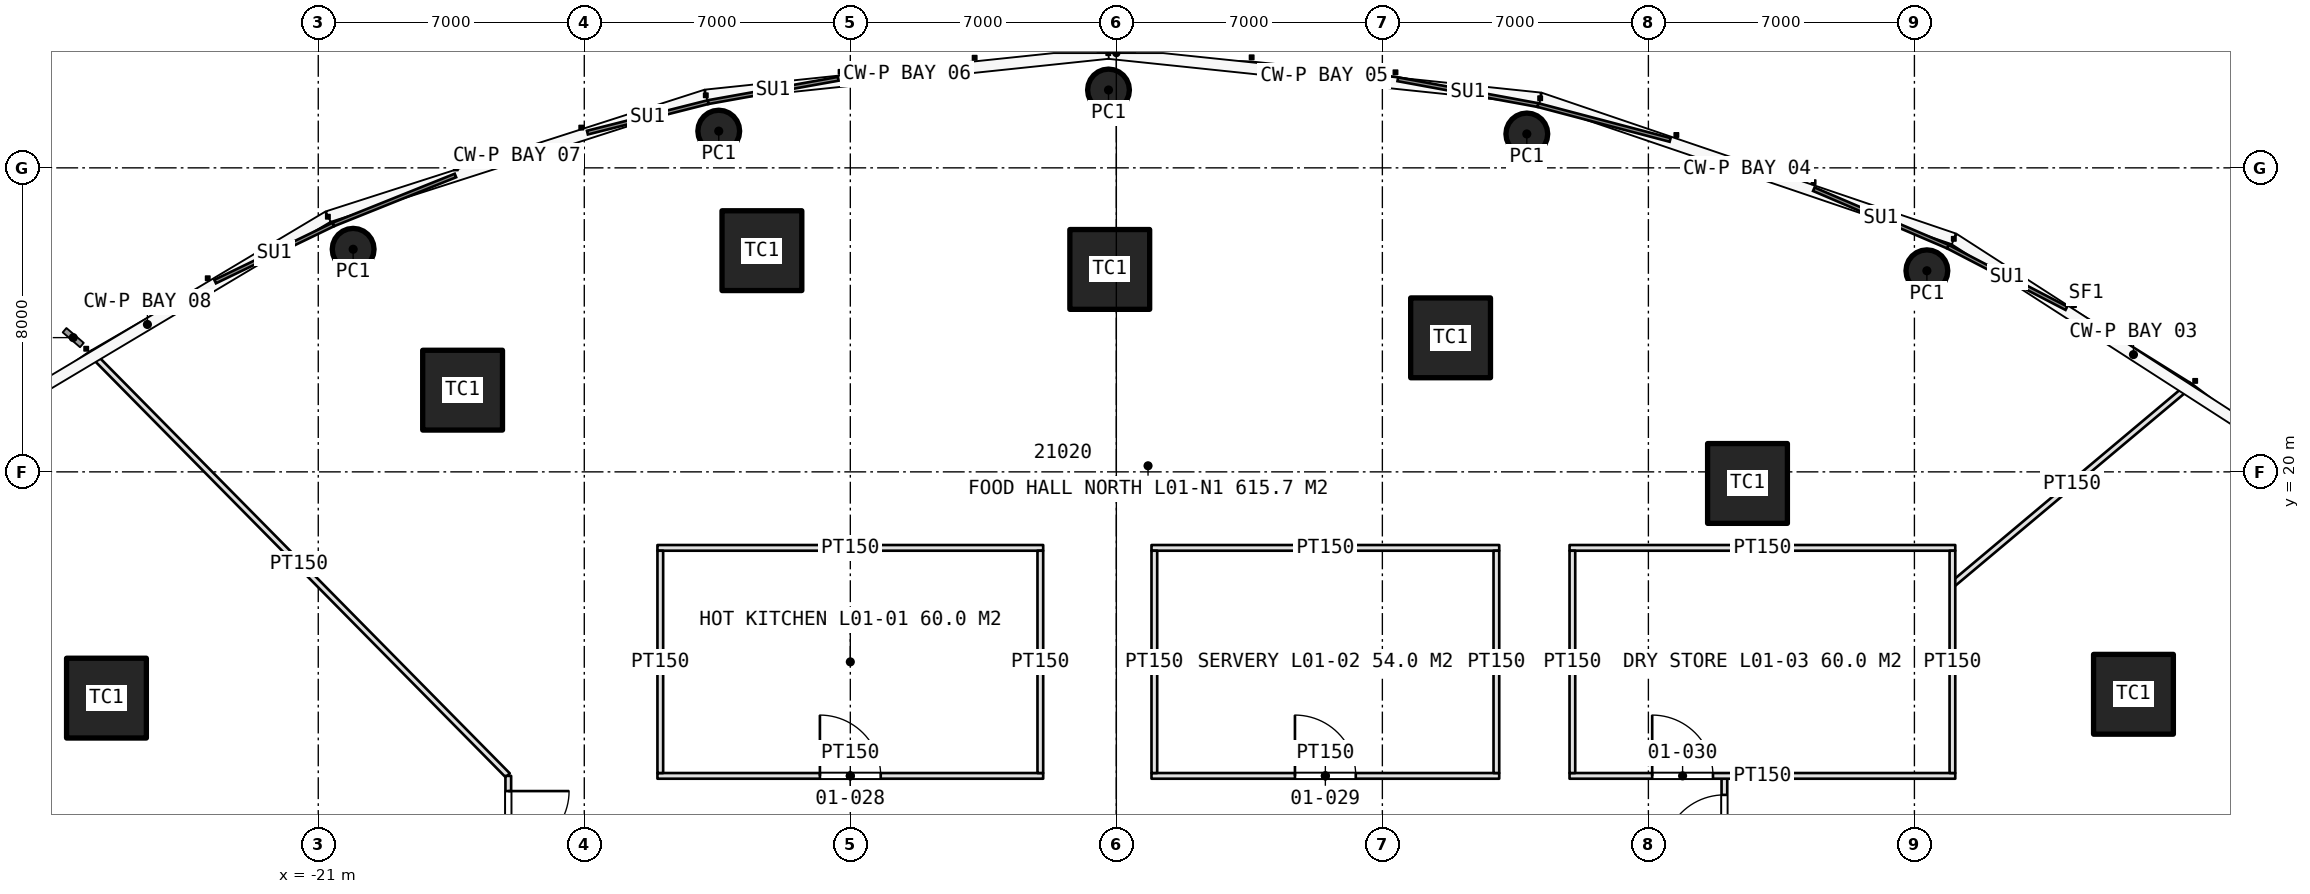
"""IFC4 building model, lengths in metres.
Left out: names, types, materials, properties, quantities, classifications, styles, units other than length and angle.
Written with IfcOpenShell. Run it as: python <this file> out.ifc"""

import sys

from ifc_helpers import new_model, si_unit, direction, frame, frame_2d, origin, origin_2d, place, context, subcontext, project, spatial, rectangle, circle, extrude, element, fill, save


model = new_model("IFC4")
c1 = context("Model", 3, precision=1e-05, world=origin(), true_north=direction((0.0, 1.0)))
c2 = subcontext(c1, "Body", "Model", "MODEL_VIEW")
j1 = project(units=[si_unit("LENGTHUNIT", "METRE"), si_unit("PLANEANGLEUNIT", "RADIAN")], contexts=[c1])
p1 = place(None, origin())
s1 = spatial("IfcSite", under=j1, at=p1, CompositionType="ELEMENT")
p2 = place(p1, origin())
s2 = spatial("IfcBuilding", under=s1, at=p2, CompositionType="ELEMENT")
p3 = place(p2, frame((0.0, 0.0, 5.0)))
s3 = spatial("IfcBuildingStorey", under=s2, at=p3, CompositionType="ELEMENT", Elevation=5.0)
for number, where, z_axis, x_axis in (
    (1, (26.764, 14.147, 0.0), (0.0, 0.0, 1.0), (1.0, 0.0, 0.0)),
    (2, (16.608, 19.695, 0.0), (0.0, 0.0, 1.0), (1.0, 0.0, 0.0)),
    (3, (8.795, 23.527, 0.0), (0.0, 0.0, 1.0), (1.0, 0.0, 0.0)),
    (4, (-0.173, 25.327, 0.0), (0.0, 0.0, 1.0), (1.0, 0.0, 0.0)),
    (5, (-9.326, 25.821, 0.0), (0.0, 0.0, 1.0), (1.0, 0.0, 0.0)),
    (6, (-17.202, 22.15, 0.0), (0.0, 0.0, 1.0), (1.0, 0.0, 0.0)),
    (7, (-26.573, 14.046, 0.0), (0.0, 0.0, 1.0), (1.0, 0.0, 0.0)),
):
    element("IfcColumn", number, at=place(p3, frame(where, z_axis=z_axis, x_axis=x_axis)), inside=s3, PredefinedType="COLUMN", context=c2, shape_type="SweptSolid", body=[
        extrude(rectangle(XDim=2.1, YDim=2.1, at=origin_2d()), origin(), (0.0, 0.0, 1.0), 5.0),
    ])
for number, where, z_axis, x_axis in (
    (8, (21.328, 25.292, 0.0), (0.0, 0.0, 1.0), (1.0, 0.0, 0.0)),
    (9, (10.801, 28.892, 0.0), (0.0, 0.0, 1.0), (1.0, 0.0, 0.0)),
    (10, (-0.206, 30.049, 0.0), (0.0, 0.0, 1.0), (1.0, 0.0, 0.0)),
    (11, (-10.462, 28.967, 0.0), (0.0, 0.0, 1.0), (1.0, 0.0, 0.0)),
    (12, (-20.082, 25.858, 0.0), (0.0, 0.0, 1.0), (1.0, 0.0, 0.0)),
):
    element("IfcColumn", number, at=place(p3, frame(where, z_axis=z_axis, x_axis=x_axis)), inside=s3, PredefinedType="COLUMN", context=c2, shape_type="SweptSolid", body=[
        extrude(circle(Radius=0.55, at=origin_2d()), origin(), (0.0, 0.0, 1.0), 5.0),
    ])
p4 = place(p3, frame((-16.014, 12.014, 0.0), z_axis=(0.0, 0.0, 1.0), x_axis=(-0.702408551969, 0.711773999329, 0.0)))
e13 = element("IfcWall", 13, at=p4, inside=s3, PredefinedType="PARTITIONING", context=c2, shape_type="SweptSolid", body=[
    extrude(rectangle(XDim=15.641, YDim=0.15, at=frame_2d((7.82, 0.0))), origin(), (0.0, 0.0, 1.0), 3.8),
])
p5 = place(p3, frame((22.02, 17.053, 0.0), z_axis=(0.0, 0.0, 1.0), x_axis=(0.765913812557, 0.64294325701, 0.0)))
e14 = element("IfcWall", 14, at=p5, inside=s3, PredefinedType="PARTITIONING", context=c2, shape_type="SweptSolid", body=[
    extrude(rectangle(XDim=8.17, YDim=0.15, at=frame_2d((4.085, 0.0))), origin(), (0.0, 0.0, 1.0), 3.8),
])
p6 = place(p3, frame((16.0, -12.0, 0.0), z_axis=(0.0, 0.0, 1.0), x_axis=(0.0, 1.0, 0.0)))
e15 = element("IfcWall", 15, at=p6, inside=s3, PredefinedType="PARTITIONING", context=c2, shape_type="SweptSolid", body=[
    extrude(rectangle(XDim=24.0, YDim=0.15, at=frame_2d((12.0, 0.0))), origin(), (0.0, 0.0, 1.0), 3.8),
])
p7 = place(p6, frame((10.15, 0.0, 0.0)))
e16 = element("IfcOpeningElement", 16, at=p7, cuts=e15, PredefinedType="OPENING", context=c2, shape_type="SweptSolid", body=[
    extrude(rectangle(XDim=1.6, YDim=2.4, at=frame_2d((0.8, 1.2))), frame((0.0, 0.085, 0.0), z_axis=(0.0, -1.0, 0.0), x_axis=(1.0, 0.0, 0.0)), (0.0, 0.0, 1.0), 0.17),
])
p8 = place(p6, frame((21.9, 0.0, 0.0)))
e17 = element("IfcOpeningElement", 17, at=p8, cuts=e15, PredefinedType="OPENING", context=c2, shape_type="SweptSolid", body=[
    extrude(rectangle(XDim=1.6, YDim=2.4, at=frame_2d((0.8, 1.2))), frame((0.0, 0.085, 0.0), z_axis=(0.0, -1.0, 0.0), x_axis=(1.0, 0.0, 0.0)), (0.0, 0.0, 1.0), 0.17),
])
p9 = place(p6, frame((0.75, 0.0, 0.0)))
e18 = element("IfcOpeningElement", 18, at=p9, cuts=e15, PredefinedType="OPENING", context=c2, shape_type="SweptSolid", body=[
    extrude(rectangle(XDim=1.6, YDim=2.4, at=frame_2d((0.8, 1.2))), frame((0.0, 0.085, 0.0), z_axis=(0.0, -1.0, 0.0), x_axis=(1.0, 0.0, 0.0)), (0.0, 0.0, 1.0), 0.17),
])
p10 = place(p3, frame((-16.0, 12.0, 0.0), z_axis=(0.0, 0.0, 1.0), x_axis=(0.0, -1.0, 0.0)))
e19 = element("IfcWall", 19, at=p10, inside=s3, PredefinedType="PARTITIONING", context=c2, shape_type="SweptSolid", body=[
    extrude(rectangle(XDim=24.0, YDim=0.15, at=frame_2d((12.0, 0.0))), origin(), (0.0, 0.0, 1.0), 3.8),
])
p11 = place(p10, frame((12.15, 0.0, 0.0)))
e20 = element("IfcOpeningElement", 20, at=p11, cuts=e19, PredefinedType="OPENING", context=c2, shape_type="SweptSolid", body=[
    extrude(rectangle(XDim=1.6, YDim=2.4, at=frame_2d((0.8, 1.2))), frame((0.0, 0.085, 0.0), z_axis=(0.0, -1.0, 0.0), x_axis=(1.0, 0.0, 0.0)), (0.0, 0.0, 1.0), 0.17),
])
p12 = place(p10, frame((0.4, 0.0, 0.0)))
e21 = element("IfcOpeningElement", 21, at=p12, cuts=e19, PredefinedType="OPENING", context=c2, shape_type="SweptSolid", body=[
    extrude(rectangle(XDim=1.6, YDim=2.4, at=frame_2d((0.8, 1.2))), frame((0.0, 0.085, 0.0), z_axis=(0.0, -1.0, 0.0), x_axis=(1.0, 0.0, 0.0)), (0.0, 0.0, 1.0), 0.17),
])
p13 = place(p10, frame((21.9, 0.0, 0.0)))
e22 = element("IfcOpeningElement", 22, at=p13, cuts=e19, PredefinedType="OPENING", context=c2, shape_type="SweptSolid", body=[
    extrude(rectangle(XDim=1.6, YDim=2.4, at=frame_2d((0.8, 1.2))), frame((0.0, 0.085, 0.0), z_axis=(0.0, -1.0, 0.0), x_axis=(1.0, 0.0, 0.0)), (0.0, 0.0, 1.0), 0.17),
])
p14 = place(p3, frame((-12.075, 12.0, 0.0), z_axis=(0.0, 0.0, 1.0), x_axis=(1.0, 0.0, 0.0)))
e23 = element("IfcWall", 23, at=p14, inside=s3, PredefinedType="PARTITIONING", context=c2, shape_type="SweptSolid", body=[
    extrude(rectangle(XDim=10.15, YDim=0.15, at=frame_2d((5.075, 0.0))), origin(), (0.0, 0.0, 1.0), 3.8),
])
p15 = place(p14, frame((4.275, 0.0, 0.0)))
e24 = element("IfcOpeningElement", 24, at=p15, cuts=e23, PredefinedType="OPENING", context=c2, shape_type="SweptSolid", body=[
    extrude(rectangle(XDim=1.6, YDim=2.4, at=frame_2d((0.8, 1.2))), frame((0.0, 0.085, 0.0), z_axis=(0.0, -1.0, 0.0), x_axis=(1.0, 0.0, 0.0)), (0.0, 0.0, 1.0), 0.17),
])
p16 = place(p3, frame((-12.075, 18.0, 0.0), z_axis=(0.0, 0.0, 1.0), x_axis=(1.0, 0.0, 0.0)))
e25 = element("IfcWall", 25, at=p16, inside=s3, PredefinedType="PARTITIONING", context=c2, shape_type="SweptSolid", body=[
    extrude(rectangle(XDim=10.15, YDim=0.15, at=frame_2d((5.075, 0.0))), origin(), (0.0, 0.0, 1.0), 3.8),
])
for number, where, z_axis, x_axis in (
    (26, (-12.0, 12.075, 0.0), (0.0, 0.0, 1.0), (0.0, 1.0, 0.0)),
    (27, (-2.0, 12.075, 0.0), (0.0, 0.0, 1.0), (0.0, 1.0, 0.0)),
):
    element("IfcWall", number, at=place(p3, frame(where, z_axis=z_axis, x_axis=x_axis)), inside=s3, PredefinedType="PARTITIONING", context=c2, shape_type="SweptSolid", body=[
        extrude(rectangle(XDim=5.85, YDim=0.15, at=frame_2d((2.925, 0.0))), origin(), (0.0, 0.0, 1.0), 3.8),
    ])
p17 = place(p3, frame((0.925, 12.0, 0.0), z_axis=(0.0, 0.0, 1.0), x_axis=(1.0, 0.0, 0.0)))
e28 = element("IfcWall", 28, at=p17, inside=s3, PredefinedType="PARTITIONING", context=c2, shape_type="SweptSolid", body=[
    extrude(rectangle(XDim=9.15, YDim=0.15, at=frame_2d((4.575, 0.0))), origin(), (0.0, 0.0, 1.0), 3.8),
])
p18 = place(p17, frame((3.775, 0.0, 0.0)))
e29 = element("IfcOpeningElement", 29, at=p18, cuts=e28, PredefinedType="OPENING", context=c2, shape_type="SweptSolid", body=[
    extrude(rectangle(XDim=1.6, YDim=2.4, at=frame_2d((0.8, 1.2))), frame((0.0, 0.085, 0.0), z_axis=(0.0, -1.0, 0.0), x_axis=(1.0, 0.0, 0.0)), (0.0, 0.0, 1.0), 0.17),
])
p19 = place(p3, frame((0.925, 18.0, 0.0), z_axis=(0.0, 0.0, 1.0), x_axis=(1.0, 0.0, 0.0)))
e30 = element("IfcWall", 30, at=p19, inside=s3, PredefinedType="PARTITIONING", context=c2, shape_type="SweptSolid", body=[
    extrude(rectangle(XDim=9.15, YDim=0.15, at=frame_2d((4.575, 0.0))), origin(), (0.0, 0.0, 1.0), 3.8),
])
for number, where, z_axis, x_axis in (
    (31, (1.0, 12.075, 0.0), (0.0, 0.0, 1.0), (0.0, 1.0, 0.0)),
    (32, (10.0, 12.075, 0.0), (0.0, 0.0, 1.0), (0.0, 1.0, 0.0)),
):
    element("IfcWall", number, at=place(p3, frame(where, z_axis=z_axis, x_axis=x_axis)), inside=s3, PredefinedType="PARTITIONING", context=c2, shape_type="SweptSolid", body=[
        extrude(rectangle(XDim=5.85, YDim=0.15, at=frame_2d((2.925, 0.0))), origin(), (0.0, 0.0, 1.0), 3.8),
    ])
p20 = place(p3, frame((11.925, 12.0, 0.0), z_axis=(0.0, 0.0, 1.0), x_axis=(1.0, 0.0, 0.0)))
e33 = element("IfcWall", 33, at=p20, inside=s3, PredefinedType="PARTITIONING", context=c2, shape_type="SweptSolid", body=[
    extrude(rectangle(XDim=10.15, YDim=0.15, at=frame_2d((5.075, 0.0))), origin(), (0.0, 0.0, 1.0), 3.8),
])
p21 = place(p20, frame((2.175, 0.0, 0.0)))
e34 = element("IfcOpeningElement", 34, at=p21, cuts=e33, PredefinedType="OPENING", context=c2, shape_type="SweptSolid", body=[
    extrude(rectangle(XDim=1.6, YDim=2.4, at=frame_2d((0.8, 1.2))), frame((0.0, 0.085, 0.0), z_axis=(0.0, -1.0, 0.0), x_axis=(1.0, 0.0, 0.0)), (0.0, 0.0, 1.0), 0.17),
])
p22 = place(p3, frame((11.925, 18.0, 0.0), z_axis=(0.0, 0.0, 1.0), x_axis=(1.0, 0.0, 0.0)))
e35 = element("IfcWall", 35, at=p22, inside=s3, PredefinedType="PARTITIONING", context=c2, shape_type="SweptSolid", body=[
    extrude(rectangle(XDim=10.15, YDim=0.15, at=frame_2d((5.075, 0.0))), origin(), (0.0, 0.0, 1.0), 3.8),
])
for number, where, z_axis, x_axis in (
    (36, (12.0, 12.075, 0.0), (0.0, 0.0, 1.0), (0.0, 1.0, 0.0)),
    (37, (22.0, 12.075, 0.0), (0.0, 0.0, 1.0), (0.0, 1.0, 0.0)),
):
    element("IfcWall", number, at=place(p3, frame(where, z_axis=z_axis, x_axis=x_axis)), inside=s3, PredefinedType="PARTITIONING", context=c2, shape_type="SweptSolid", body=[
        extrude(rectangle(XDim=5.85, YDim=0.15, at=frame_2d((2.925, 0.0))), origin(), (0.0, 0.0, 1.0), 3.8),
    ])
p23 = place(p15, origin())
e38 = element("IfcDoor", 38, at=p23, inside=s3, OperationType="DOUBLE_DOOR_SINGLE_SWING", PredefinedType="DOOR", context=c2, shape_type="SweptSolid", body=[
    extrude(rectangle(XDim=1.6, YDim=2.4, at=frame_2d((0.8, 1.2))), frame((0.0, 0.025, 0.0), z_axis=(0.0, -1.0, 0.0), x_axis=(1.0, 0.0, 0.0)), (0.0, 0.0, 1.0), 0.05),
])
fill(e24, e38)
p24 = place(p18, origin())
e39 = element("IfcDoor", 39, at=p24, inside=s3, OperationType="DOUBLE_DOOR_SINGLE_SWING", PredefinedType="DOOR", context=c2, shape_type="SweptSolid", body=[
    extrude(rectangle(XDim=1.6, YDim=2.4, at=frame_2d((0.8, 1.2))), frame((0.0, 0.025, 0.0), z_axis=(0.0, -1.0, 0.0), x_axis=(1.0, 0.0, 0.0)), (0.0, 0.0, 1.0), 0.05),
])
fill(e29, e39)
p25 = place(p21, origin())
e40 = element("IfcDoor", 40, at=p25, inside=s3, OperationType="DOUBLE_DOOR_SINGLE_SWING", PredefinedType="DOOR", context=c2, shape_type="SweptSolid", body=[
    extrude(rectangle(XDim=1.6, YDim=2.4, at=frame_2d((0.8, 1.2))), frame((0.0, 0.025, 0.0), z_axis=(0.0, -1.0, 0.0), x_axis=(1.0, 0.0, 0.0)), (0.0, 0.0, 1.0), 0.05),
])
fill(e34, e40)
p26 = place(p8, origin())
e41 = element("IfcDoor", 41, at=p26, inside=s3, OperationType="DOUBLE_DOOR_SINGLE_SWING", PredefinedType="DOOR", context=c2, shape_type="SweptSolid", body=[
    extrude(rectangle(XDim=1.6, YDim=2.4, at=frame_2d((0.8, 1.2))), frame((0.0, 0.025, 0.0), z_axis=(0.0, -1.0, 0.0), x_axis=(1.0, 0.0, 0.0)), (0.0, 0.0, 1.0), 0.05),
])
fill(e17, e41)
p27 = place(p12, origin())
e42 = element("IfcDoor", 42, at=p27, inside=s3, OperationType="DOUBLE_DOOR_SINGLE_SWING", PredefinedType="DOOR", context=c2, shape_type="SweptSolid", body=[
    extrude(rectangle(XDim=1.6, YDim=2.4, at=frame_2d((0.8, 1.2))), frame((0.0, 0.025, 0.0), z_axis=(0.0, -1.0, 0.0), x_axis=(1.0, 0.0, 0.0)), (0.0, 0.0, 1.0), 0.05),
])
fill(e21, e42)
save(model, sys.argv[1])
